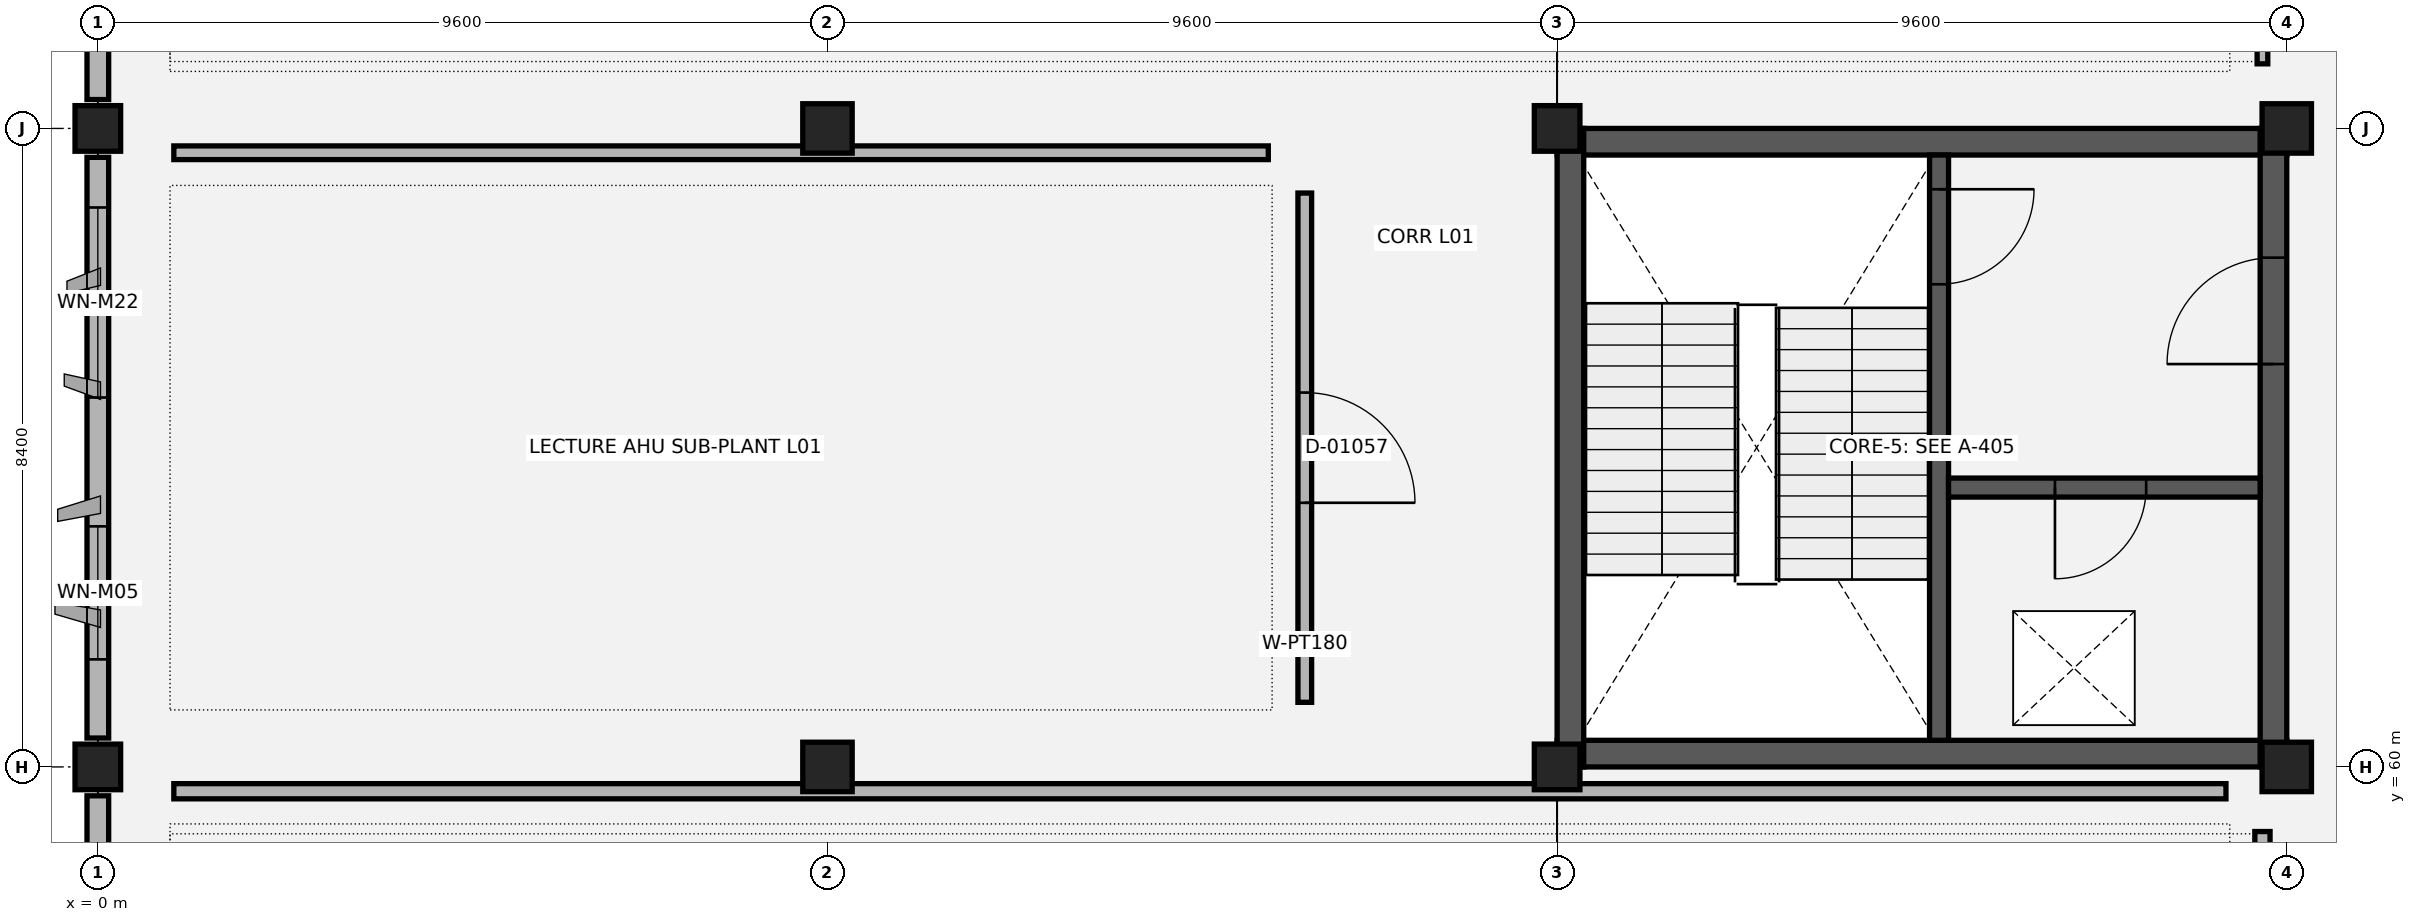
"""IFC4 building model, lengths in metres.
Left out: names, types, materials, properties, quantities, classifications, styles, units other than length and angle.
Written with IfcOpenShell. Run it as: python <this file> out.ifc"""

import sys

from ifc_helpers import new_model, si_unit, direction, frame, frame_2d, origin, origin_2d, place, context, subcontext, project, spatial, rectangle, extrude, element, fill, save


model = new_model("IFC4")
c1 = context("Model", 3, precision=1e-05, world=origin(), true_north=direction((0.0, 1.0)))
c2 = subcontext(c1, "Body", "Model", "MODEL_VIEW")
j1 = project(units=[si_unit("LENGTHUNIT", "METRE"), si_unit("PLANEANGLEUNIT", "RADIAN")], contexts=[c1])
p1 = place(None, origin())
s1 = spatial("IfcSite", under=j1, at=p1, CompositionType="ELEMENT")
p2 = place(p1, origin())
s2 = spatial("IfcBuilding", under=s1, at=p2, CompositionType="ELEMENT")
p3 = place(p2, frame((0.0, 0.0, 5.4)))
s3 = spatial("IfcBuildingStorey", under=s2, at=p3, CompositionType="ELEMENT", Elevation=5.4)
for number, where, z_axis, x_axis in (
    (1, (0.0, 60.0, 0.0), (0.0, 0.0, 1.0), (1.0, 0.0, 0.0)),
    (2, (0.0, 68.4, 0.0), (0.0, 0.0, 1.0), (1.0, 0.0, 0.0)),
):
    element("IfcColumn", number, at=place(p3, frame(where, z_axis=z_axis, x_axis=x_axis)), inside=s3, PredefinedType="COLUMN", context=c2, shape_type="SweptSolid", body=[
        extrude(rectangle(XDim=0.6, YDim=0.6, at=origin_2d()), origin(), (0.0, 0.0, 1.0), 4.8),
    ])
for number, where, z_axis, x_axis in (
    (3, (9.6, 60.0, 0.0), (0.0, 0.0, 1.0), (1.0, 0.0, 0.0)),
    (4, (9.6, 68.4, 0.0), (0.0, 0.0, 1.0), (1.0, 0.0, 0.0)),
):
    element("IfcColumn", number, at=place(p3, frame(where, z_axis=z_axis, x_axis=x_axis)), inside=s3, PredefinedType="COLUMN", context=c2, shape_type="SweptSolid", body=[
        extrude(rectangle(XDim=0.65, YDim=0.65, at=origin_2d()), origin(), (0.0, 0.0, 1.0), 4.8),
    ])
for number, where, z_axis, x_axis in (
    (5, (19.2, 60.0, 0.0), (0.0, 0.0, 1.0), (1.0, 0.0, 0.0)),
    (6, (19.2, 68.4, 0.0), (0.0, 0.0, 1.0), (1.0, 0.0, 0.0)),
):
    element("IfcColumn", number, at=place(p3, frame(where, z_axis=z_axis, x_axis=x_axis)), inside=s3, PredefinedType="COLUMN", context=c2, shape_type="SweptSolid", body=[
        extrude(rectangle(XDim=0.6, YDim=0.6, at=origin_2d()), origin(), (0.0, 0.0, 1.0), 4.8),
    ])
for number, where, z_axis, x_axis in (
    (7, (28.8, 60.0, 0.0), (0.0, 0.0, 1.0), (1.0, 0.0, 0.0)),
    (8, (28.8, 68.4, 0.0), (0.0, 0.0, 1.0), (1.0, 0.0, 0.0)),
):
    element("IfcColumn", number, at=place(p3, frame(where, z_axis=z_axis, x_axis=x_axis)), inside=s3, PredefinedType="COLUMN", context=c2, shape_type="SweptSolid", body=[
        extrude(rectangle(XDim=0.65, YDim=0.65, at=origin_2d()), origin(), (0.0, 0.0, 1.0), 4.8),
    ])
p4 = place(p3, frame((0.0, 59.62, 0.0), z_axis=(0.0, 0.0, 1.0), x_axis=(0.0, -1.0, 0.0)))
e9 = element("IfcWall", 9, at=p4, inside=s3, PredefinedType="SOLIDWALL", context=c2, shape_type="SweptSolid", body=[
    extrude(rectangle(XDim=7.64, YDim=0.285, at=frame_2d((3.82, 0.0))), origin(), (0.0, 0.0, 1.0), 3.28),
])
p5 = place(p4, frame((1.06, 0.0, 0.9)))
e10 = element("IfcOpeningElement", 10, at=p5, cuts=e9, PredefinedType="OPENING", context=c2, shape_type="SweptSolid", body=[
    extrude(rectangle(XDim=1.7, YDim=1.45, at=frame_2d((0.85, 0.725))), frame((0.0, 0.152, 0.0), z_axis=(0.0, -1.0, 0.0), x_axis=(1.0, 0.0, 0.0)), (0.0, 0.0, 1.0), 0.305),
])
p6 = place(p4, frame((5.005, 0.0, 0.9)))
e11 = element("IfcOpeningElement", 11, at=p6, cuts=e9, PredefinedType="OPENING", context=c2, shape_type="SweptSolid", body=[
    extrude(rectangle(XDim=1.45, YDim=1.45, at=frame_2d((0.725, 0.725))), frame((0.0, 0.152, 0.0), z_axis=(0.0, -1.0, 0.0), x_axis=(1.0, 0.0, 0.0)), (0.0, 0.0, 1.0), 0.305),
])
p7 = place(p3, frame((0.0, 68.02, 0.0), z_axis=(0.0, 0.0, 1.0), x_axis=(0.0, -1.0, 0.0)))
e12 = element("IfcWall", 12, at=p7, inside=s3, PredefinedType="SOLIDWALL", context=c2, shape_type="SweptSolid", body=[
    extrude(rectangle(XDim=7.64, YDim=0.285, at=frame_2d((3.82, 0.0))), origin(), (0.0, 0.0, 1.0), 3.28),
])
p8 = place(p7, frame((0.66, 0.0, 0.9)))
e13 = element("IfcOpeningElement", 13, at=p8, cuts=e12, PredefinedType="OPENING", context=c2, shape_type="SweptSolid", body=[
    extrude(rectangle(XDim=2.5, YDim=1.65, at=frame_2d((1.25, 0.825))), frame((0.0, 0.152, 0.0), z_axis=(0.0, -1.0, 0.0), x_axis=(1.0, 0.0, 0.0)), (0.0, 0.0, 1.0), 0.305),
])
p9 = place(p7, frame((4.855, 0.0, 0.9)))
e14 = element("IfcOpeningElement", 14, at=p9, cuts=e12, PredefinedType="OPENING", context=c2, shape_type="SweptSolid", body=[
    extrude(rectangle(XDim=1.75, YDim=1.55, at=frame_2d((0.875, 0.775))), frame((0.0, 0.152, 0.0), z_axis=(0.0, -1.0, 0.0), x_axis=(1.0, 0.0, 0.0)), (0.0, 0.0, 1.0), 0.305),
])
p10 = place(p3, frame((0.0, 76.42, 0.0), z_axis=(0.0, 0.0, 1.0), x_axis=(0.0, -1.0, 0.0)))
e15 = element("IfcWall", 15, at=p10, inside=s3, PredefinedType="SOLIDWALL", context=c2, shape_type="SweptSolid", body=[
    extrude(rectangle(XDim=7.64, YDim=0.285, at=frame_2d((3.82, 0.0))), origin(), (0.0, 0.0, 1.0), 3.28),
])
p11 = place(p10, frame((1.26, 0.0, 0.9)))
e16 = element("IfcOpeningElement", 16, at=p11, cuts=e15, PredefinedType="OPENING", context=c2, shape_type="SweptSolid", body=[
    extrude(rectangle(XDim=1.3, YDim=1.4, at=frame_2d((0.65, 0.7))), frame((0.0, 0.152, 0.0), z_axis=(0.0, -1.0, 0.0), x_axis=(1.0, 0.0, 0.0)), (0.0, 0.0, 1.0), 0.305),
])
p12 = place(p10, frame((4.705, 0.0, 0.9)))
e17 = element("IfcOpeningElement", 17, at=p12, cuts=e15, PredefinedType="OPENING", context=c2, shape_type="SweptSolid", body=[
    extrude(rectangle(XDim=2.05, YDim=1.6, at=frame_2d((1.025, 0.8))), frame((0.0, 0.152, 0.0), z_axis=(0.0, -1.0, 0.0), x_axis=(1.0, 0.0, 0.0)), (0.0, 0.0, 1.0), 0.305),
])
for number, where, z_axis, x_axis in (
    (18, (19.2, 68.225, 0.0), (0.0, 0.0, 1.0), (1.0, 0.0, 0.0)),
    (19, (19.2, 60.175, 0.0), (0.0, 0.0, 1.0), (1.0, 0.0, 0.0)),
):
    element("IfcWall", number, at=place(p3, frame(where, z_axis=z_axis, x_axis=x_axis)), inside=s3, PredefinedType="SHEAR", context=c2, shape_type="SweptSolid", body=[
        extrude(rectangle(XDim=9.6, YDim=0.35, at=frame_2d((4.8, 0.0))), origin(), (0.0, 0.0, 1.0), 4.48),
    ])
p13 = place(p3, frame((19.375, 60.0, 0.0), z_axis=(0.0, 0.0, 1.0), x_axis=(0.0, 1.0, 0.0)))
e20 = element("IfcWall", 20, at=p13, inside=s3, PredefinedType="SHEAR", context=c2, shape_type="SweptSolid", body=[
    extrude(rectangle(XDim=8.4, YDim=0.35, at=frame_2d((4.2, 0.0))), origin(), (0.0, 0.0, 1.0), 4.48),
])
p14 = place(p3, frame((28.625, 60.0, 0.0), z_axis=(0.0, 0.0, 1.0), x_axis=(0.0, 1.0, 0.0)))
e21 = element("IfcWall", 21, at=p14, inside=s3, PredefinedType="SHEAR", context=c2, shape_type="SweptSolid", body=[
    extrude(rectangle(XDim=8.4, YDim=0.35, at=frame_2d((4.2, 0.0))), origin(), (0.0, 0.0, 1.0), 4.48),
])
p15 = place(p14, frame((5.3, 0.0, 0.0)))
e22 = element("IfcOpeningElement", 22, at=p15, cuts=e21, PredefinedType="OPENING", context=c2, shape_type="SweptSolid", body=[
    extrude(rectangle(XDim=1.4, YDim=2.15, at=frame_2d((0.7, 1.075))), frame((0.0, 0.185, 0.0), z_axis=(0.0, -1.0, 0.0), x_axis=(1.0, 0.0, 0.0)), (0.0, 0.0, 1.0), 0.37),
])
p16 = place(p3, frame((24.225, 68.05, 0.0), z_axis=(0.0, 0.0, 1.0), x_axis=(0.0, -1.0, 0.0)))
e23 = element("IfcWall", 23, at=p16, inside=s3, PredefinedType="SHEAR", context=c2, shape_type="SweptSolid", body=[
    extrude(rectangle(XDim=7.7, YDim=0.25, at=frame_2d((3.85, 0.0))), origin(), (0.0, 0.0, 1.0), 4.48),
])
p17 = place(p16, frame((0.45, 0.0, 0.0)))
e24 = element("IfcOpeningElement", 24, at=p17, cuts=e23, PredefinedType="OPENING", context=c2, shape_type="SweptSolid", body=[
    extrude(rectangle(XDim=1.25, YDim=2.15, at=frame_2d((0.625, 1.075))), frame((0.0, 0.135, 0.0), z_axis=(0.0, -1.0, 0.0), x_axis=(1.0, 0.0, 0.0)), (0.0, 0.0, 1.0), 0.27),
])
p18 = place(p3, frame((24.35, 63.675, 0.0), z_axis=(0.0, 0.0, 1.0), x_axis=(1.0, 0.0, 0.0)))
e25 = element("IfcWall", 25, at=p18, inside=s3, PredefinedType="SHEAR", context=c2, shape_type="SweptSolid", body=[
    extrude(rectangle(XDim=4.1, YDim=0.25, at=frame_2d((2.05, 0.0))), origin(), (0.0, 0.0, 1.0), 4.48),
])
p19 = place(p18, frame((1.4, 0.0, 0.0)))
e26 = element("IfcOpeningElement", 26, at=p19, cuts=e25, PredefinedType="OPENING", context=c2, shape_type="SweptSolid", body=[
    extrude(rectangle(XDim=1.2, YDim=2.15, at=frame_2d((0.6, 1.075))), frame((0.0, 0.135, 0.0), z_axis=(0.0, -1.0, 0.0), x_axis=(1.0, 0.0, 0.0)), (0.0, 0.0, 1.0), 0.27),
])
p20 = place(p3, frame((28.48, 33.25, 0.0), z_axis=(0.0, 0.0, 1.0), x_axis=(0.0, 1.0, 0.0)))
e27 = element("IfcWall", 27, at=p20, inside=s3, PredefinedType="PARTITIONING", context=c2, shape_type="SweptSolid", body=[
    extrude(rectangle(XDim=25.9, YDim=0.2, at=frame_2d((12.95, 0.0))), origin(), (0.0, 0.0, 1.0), 3.26),
])
p21 = place(p20, frame((14.47, 0.0, 0.0)))
e28 = element("IfcOpeningElement", 28, at=p21, cuts=e27, PredefinedType="OPENING", context=c2, shape_type="SweptSolid", body=[
    extrude(rectangle(XDim=1.65, YDim=2.15, at=frame_2d((0.825, 1.075))), frame((0.0, 0.11, 0.0), z_axis=(0.0, -1.0, 0.0), x_axis=(1.0, 0.0, 0.0)), (0.0, 0.0, 1.0), 0.22),
])
p22 = place(p3, frame((1.0, 59.68, 0.0), z_axis=(0.0, 0.0, 1.0), x_axis=(1.0, 0.0, 0.0)))
e29 = element("IfcWall", 29, at=p22, inside=s3, PredefinedType="PARTITIONING", context=c2, shape_type="SweptSolid", body=[
    extrude(rectangle(XDim=27.0, YDim=0.2, at=frame_2d((13.5, 0.0))), origin(), (0.0, 0.0, 1.0), 3.26),
])
p23 = place(p3, frame((28.48, 69.25, 0.0), z_axis=(0.0, 0.0, 1.0), x_axis=(0.0, 1.0, 0.0)))
e30 = element("IfcWall", 30, at=p23, inside=s3, PredefinedType="PARTITIONING", context=c2, shape_type="SweptSolid", body=[
    extrude(rectangle(XDim=11.3, YDim=0.14, at=frame_2d((5.65, 0.0))), origin(), (0.0, 0.0, 1.0), 3.26),
])
p24 = place(p23, frame((2.765, 0.0, 0.0)))
e31 = element("IfcOpeningElement", 31, at=p24, cuts=e30, PredefinedType="OPENING", context=c2, shape_type="SweptSolid", body=[
    extrude(rectangle(XDim=1.04, YDim=2.15, at=frame_2d((0.52, 1.075))), frame((0.0, 0.08, 0.0), z_axis=(0.0, -1.0, 0.0), x_axis=(1.0, 0.0, 0.0)), (0.0, 0.0, 1.0), 0.16),
])
p25 = place(p3, frame((15.88, 60.85, 0.0), z_axis=(0.0, 0.0, 1.0), x_axis=(0.0, 1.0, 0.0)))
e32 = element("IfcWall", 32, at=p25, inside=s3, PredefinedType="PARTITIONING", context=c2, shape_type="SweptSolid", body=[
    extrude(rectangle(XDim=6.7, YDim=0.18, at=frame_2d((3.35, 0.0))), origin(), (0.0, 0.0, 1.0), 3.26),
])
p26 = place(p25, frame((2.625, 0.0, 0.0)))
e33 = element("IfcOpeningElement", 33, at=p26, cuts=e32, PredefinedType="OPENING", context=c2, shape_type="SweptSolid", body=[
    extrude(rectangle(XDim=1.45, YDim=2.15, at=frame_2d((0.725, 1.075))), frame((0.0, 0.1, 0.0), z_axis=(0.0, -1.0, 0.0), x_axis=(1.0, 0.0, 0.0)), (0.0, 0.0, 1.0), 0.2),
])
p27 = place(p3, frame((1.0, 68.08, 0.0), z_axis=(0.0, 0.0, 1.0), x_axis=(1.0, 0.0, 0.0)))
e34 = element("IfcWall", 34, at=p27, inside=s3, PredefinedType="PARTITIONING", context=c2, shape_type="SweptSolid", body=[
    extrude(rectangle(XDim=14.4, YDim=0.18, at=frame_2d((7.2, 0.0))), origin(), (0.0, 0.0, 1.0), 3.26),
])
p28 = place(p8, origin())
e35 = element("IfcWindow", 35, at=p28, inside=s3, PartitioningType="SINGLE_PANEL", PredefinedType="WINDOW", context=c2, shape_type="SweptSolid", body=[
    extrude(rectangle(XDim=2.5, YDim=1.65, at=frame_2d((1.25, 0.825))), frame((0.0, 0.03, 0.0), z_axis=(0.0, -1.0, 0.0), x_axis=(1.0, 0.0, 0.0)), (0.0, 0.0, 1.0), 0.06),
])
fill(e13, e35)
p29 = place(p9, origin())
e36 = element("IfcWindow", 36, at=p29, inside=s3, PartitioningType="SINGLE_PANEL", PredefinedType="WINDOW", context=c2, shape_type="SweptSolid", body=[
    extrude(rectangle(XDim=1.75, YDim=1.55, at=frame_2d((0.875, 0.775))), frame((0.0, 0.03, 0.0), z_axis=(0.0, -1.0, 0.0), x_axis=(1.0, 0.0, 0.0)), (0.0, 0.0, 1.0), 0.06),
])
fill(e14, e36)
p30 = place(p17, origin())
e37 = element("IfcDoor", 37, at=p30, inside=s3, OperationType="SINGLE_SWING_LEFT", PredefinedType="DOOR", context=c2, shape_type="SweptSolid", body=[
    extrude(rectangle(XDim=1.25, YDim=2.15, at=frame_2d((0.625, 1.075))), frame((0.0, 0.025, 0.0), z_axis=(0.0, -1.0, 0.0), x_axis=(1.0, 0.0, 0.0)), (0.0, 0.0, 1.0), 0.05),
])
fill(e24, e37)
p31 = place(p19, origin())
e38 = element("IfcDoor", 38, at=p31, inside=s3, OperationType="SINGLE_SWING_RIGHT", PredefinedType="DOOR", context=c2, shape_type="SweptSolid", body=[
    extrude(rectangle(XDim=1.2, YDim=2.15, at=frame_2d((0.6, 1.075))), frame((0.0, 0.025, 0.0), z_axis=(0.0, -1.0, 0.0), x_axis=(1.0, 0.0, 0.0)), (0.0, 0.0, 1.0), 0.05),
])
fill(e26, e38)
p32 = place(p15, origin())
e39 = element("IfcDoor", 39, at=p32, inside=s3, OperationType="SINGLE_SWING_LEFT", PredefinedType="DOOR", context=c2, shape_type="SweptSolid", body=[
    extrude(rectangle(XDim=1.4, YDim=2.15, at=frame_2d((0.7, 1.075))), frame((0.0, 0.025, 0.0), z_axis=(0.0, -1.0, 0.0), x_axis=(1.0, 0.0, 0.0)), (0.0, 0.0, 1.0), 0.05),
])
fill(e22, e39)
p33 = place(p26, origin())
e40 = element("IfcDoor", 40, at=p33, inside=s3, OperationType="SINGLE_SWING_RIGHT", PredefinedType="DOOR", context=c2, shape_type="SweptSolid", body=[
    extrude(rectangle(XDim=1.45, YDim=2.15, at=frame_2d((0.725, 1.075))), frame((0.0, 0.025, 0.0), z_axis=(0.0, -1.0, 0.0), x_axis=(1.0, 0.0, 0.0)), (0.0, 0.0, 1.0), 0.05),
])
fill(e33, e40)
save(model, sys.argv[1])
